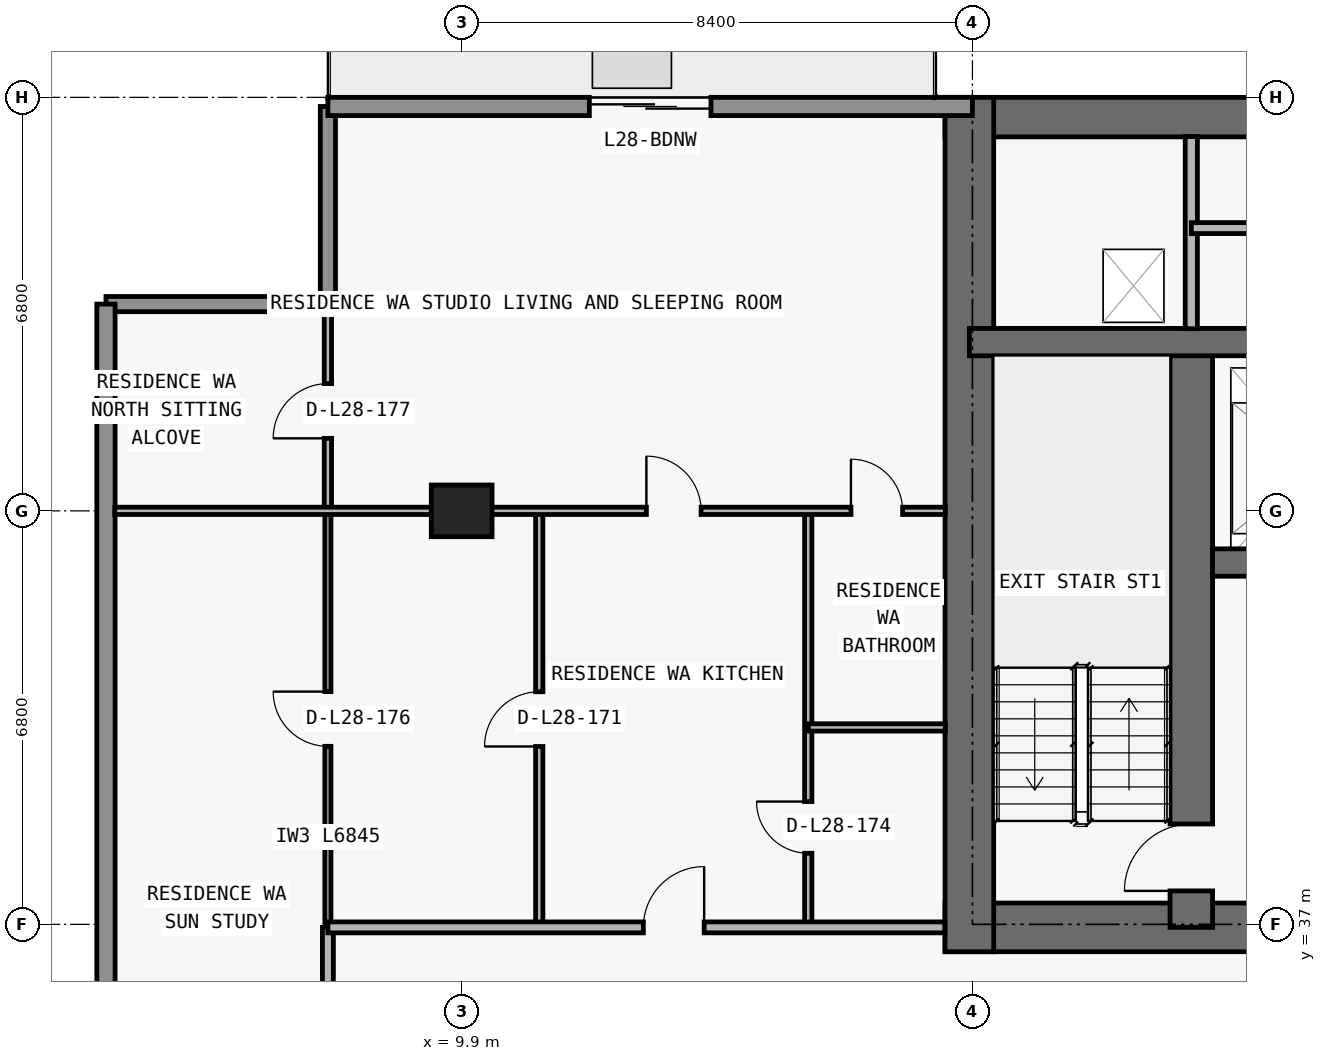
"""IFC4 building model, lengths in metres.
Left out: names, types, materials, properties, quantities, classifications, styles, units other than length and angle.
Written with IfcOpenShell. Run it as: python <this file> out.ifc"""

import sys

from ifc_helpers import new_model, si_unit, direction, frame, frame_2d, origin, origin_2d, place, context, subcontext, project, spatial, rectangle, extrude, element, fill, save


model = new_model("IFC4")
c1 = context("Model", 3, precision=1e-05, world=origin(), true_north=direction((0.0, 1.0)))
c2 = subcontext(c1, "Body", "Model", "MODEL_VIEW")
j1 = project(units=[si_unit("LENGTHUNIT", "METRE"), si_unit("PLANEANGLEUNIT", "RADIAN")], contexts=[c1])
p1 = place(None, origin())
s1 = spatial("IfcSite", under=j1, at=p1, CompositionType="ELEMENT")
p2 = place(p1, origin())
s2 = spatial("IfcBuilding", under=s1, at=p2, CompositionType="ELEMENT")
p3 = place(p2, frame((0.0, 0.0, 105.9)))
s3 = spatial("IfcBuildingStorey", under=s2, at=p3, CompositionType="ELEMENT", Elevation=105.9)
p4 = place(p3, frame((9.9, 43.8, 0.0), z_axis=(0.0, 0.0, 1.0), x_axis=(1.0, 0.0, 0.0)))
e1 = element("IfcColumn", 1, at=p4, inside=s3, PredefinedType="COLUMN", context=c2, shape_type="SweptSolid", body=[
    extrude(rectangle(XDim=1.0, YDim=0.85, at=origin_2d()), origin(), (0.0, 0.0, 1.0), 3.05),
])
p5 = place(p3, frame((17.85, 36.95, 0.0), z_axis=(0.0, 0.0, 1.0), x_axis=(1.0, 0.0, 0.0)))
e2 = element("IfcWall", 2, at=p5, inside=s3, PredefinedType="SHEAR", context=c2, shape_type="SweptSolid", body=[
    extrude(rectangle(XDim=42.1, YDim=0.8, at=frame_2d((21.05, 0.0))), origin(), (0.0, 0.0, 1.0), 3.05),
])
p6 = place(p5, frame((14.45, 0.0, 0.0)))
e3 = element("IfcOpeningElement", 3, at=p6, cuts=e2, PredefinedType="OPENING", context=c2, shape_type="SweptSolid", body=[
    extrude(rectangle(XDim=1.1, YDim=2.15, at=frame_2d((0.55, 1.075))), frame((0.0, 0.41, 0.0), z_axis=(0.0, -1.0, 0.0), x_axis=(1.0, 0.0, 0.0)), (0.0, 0.0, 1.0), 0.82),
])
p7 = place(p5, frame((6.3, 0.0, 0.0)))
e4 = element("IfcOpeningElement", 4, at=p7, cuts=e2, PredefinedType="OPENING", context=c2, shape_type="SweptSolid", body=[
    extrude(rectangle(XDim=1.05, YDim=2.15, at=frame_2d((0.525, 1.075))), frame((0.0, 0.41, 0.0), z_axis=(0.0, -1.0, 0.0), x_axis=(1.0, 0.0, 0.0)), (0.0, 0.0, 1.0), 0.82),
])
p8 = place(p5, frame((34.8, 0.0, 0.0)))
e5 = element("IfcOpeningElement", 5, at=p8, cuts=e2, PredefinedType="OPENING", context=c2, shape_type="SweptSolid", body=[
    extrude(rectangle(XDim=1.05, YDim=2.15, at=frame_2d((0.525, 1.075))), frame((0.0, 0.41, 0.0), z_axis=(0.0, -1.0, 0.0), x_axis=(1.0, 0.0, 0.0)), (0.0, 0.0, 1.0), 0.82),
])
p9 = place(p5, frame((10.913, 0.0, 0.0)))
e6 = element("IfcOpeningElement", 6, at=p9, cuts=e2, PredefinedType="OPENING", context=c2, shape_type="SweptSolid", body=[
    extrude(rectangle(XDim=1.05, YDim=2.15, at=frame_2d((0.525, 1.075))), frame((0.0, 0.41, 0.0), z_axis=(0.0, -1.0, 0.0), x_axis=(1.0, 0.0, 0.0)), (0.0, 0.0, 1.0), 0.82),
])
p10 = place(p5, frame((24.15, 0.0, 0.0)))
e7 = element("IfcOpeningElement", 7, at=p10, cuts=e2, PredefinedType="OPENING", context=c2, shape_type="SweptSolid", body=[
    extrude(rectangle(XDim=1.05, YDim=2.15, at=frame_2d((0.525, 1.075))), frame((0.0, 0.41, 0.0), z_axis=(0.0, -1.0, 0.0), x_axis=(1.0, 0.0, 0.0)), (0.0, 0.0, 1.0), 0.82),
])
p11 = place(p3, frame((17.85, 50.275, 0.0), z_axis=(0.0, 0.0, 1.0), x_axis=(1.0, 0.0, 0.0)))
e8 = element("IfcWall", 8, at=p11, inside=s3, PredefinedType="SHEAR", context=c2, shape_type="SweptSolid", body=[
    extrude(rectangle(XDim=42.1, YDim=0.65, at=frame_2d((21.05, 0.0))), origin(), (0.0, 0.0, 1.0), 3.05),
])
p12 = place(p3, frame((18.25, 36.55, 0.0), z_axis=(0.0, 0.0, 1.0), x_axis=(0.0, 1.0, 0.0)))
e9 = element("IfcWall", 9, at=p12, inside=s3, PredefinedType="SHEAR", context=c2, shape_type="SweptSolid", body=[
    extrude(rectangle(XDim=14.05, YDim=0.8, at=frame_2d((7.025, 0.0))), origin(), (0.0, 0.0, 1.0), 3.05),
])
p13 = place(p3, frame((21.9, 36.95, 0.0), z_axis=(0.0, 0.0, 1.0), x_axis=(0.0, 1.0, 0.0)))
e10 = element("IfcWall", 10, at=p13, inside=s3, PredefinedType="SHEAR", context=c2, shape_type="SweptSolid", body=[
    extrude(rectangle(XDim=9.625, YDim=0.7, at=frame_2d((4.812, 0.0))), origin(), (0.0, 0.0, 1.0), 3.05),
])
p14 = place(p13, frame((0.6, 0.0, 0.0)))
e11 = element("IfcOpeningElement", 11, at=p14, cuts=e10, PredefinedType="OPENING", context=c2, shape_type="SweptSolid", body=[
    extrude(rectangle(XDim=1.1, YDim=2.15, at=frame_2d((0.55, 1.075))), frame((0.0, 0.36, 0.0), z_axis=(0.0, -1.0, 0.0), x_axis=(1.0, 0.0, 0.0)), (0.0, 0.0, 1.0), 0.72),
])
p15 = place(p3, frame((22.25, 42.95, 0.0), z_axis=(0.0, 0.0, 1.0), x_axis=(1.0, 0.0, 0.0)))
e12 = element("IfcWall", 12, at=p15, inside=s3, PredefinedType="SHEAR", context=c2, shape_type="SweptSolid", body=[
    extrude(rectangle(XDim=33.3, YDim=0.45, at=frame_2d((16.65, 0.0))), origin(), (0.0, 0.0, 1.0), 3.05),
])
p16 = place(p15, frame((1.05, 0.0, 0.0)))
e13 = element("IfcOpeningElement", 13, at=p16, cuts=e12, PredefinedType="OPENING", context=c2, shape_type="SweptSolid", body=[
    extrude(rectangle(XDim=1.2, YDim=2.2, at=frame_2d((0.6, 1.1))), frame((0.0, 0.235, 0.0), z_axis=(0.0, -1.0, 0.0), x_axis=(1.0, 0.0, 0.0)), (0.0, 0.0, 1.0), 0.47),
])
p17 = place(p15, frame((31.05, 0.0, 0.0)))
e14 = element("IfcOpeningElement", 14, at=p17, cuts=e12, PredefinedType="OPENING", context=c2, shape_type="SweptSolid", body=[
    extrude(rectangle(XDim=1.2, YDim=2.2, at=frame_2d((0.6, 1.1))), frame((0.0, 0.235, 0.0), z_axis=(0.0, -1.0, 0.0), x_axis=(1.0, 0.0, 0.0)), (0.0, 0.0, 1.0), 0.47),
])
p18 = place(p15, frame((21.4, 0.0, 0.0)))
e15 = element("IfcOpeningElement", 15, at=p18, cuts=e12, PredefinedType="OPENING", context=c2, shape_type="SweptSolid", body=[
    extrude(rectangle(XDim=1.1, YDim=2.2, at=frame_2d((0.55, 1.1))), frame((0.0, 0.235, 0.0), z_axis=(0.0, -1.0, 0.0), x_axis=(1.0, 0.0, 0.0)), (0.0, 0.0, 1.0), 0.47),
])
p19 = place(p15, frame((24.0, 0.0, 0.0)))
e16 = element("IfcOpeningElement", 16, at=p19, cuts=e12, PredefinedType="OPENING", context=c2, shape_type="SweptSolid", body=[
    extrude(rectangle(XDim=1.1, YDim=2.2, at=frame_2d((0.55, 1.1))), frame((0.0, 0.235, 0.0), z_axis=(0.0, -1.0, 0.0), x_axis=(1.0, 0.0, 0.0)), (0.0, 0.0, 1.0), 0.47),
])
p20 = place(p15, frame((3.625, 0.0, 0.0)))
e17 = element("IfcOpeningElement", 17, at=p20, cuts=e12, PredefinedType="OPENING", context=c2, shape_type="SweptSolid", body=[
    extrude(rectangle(XDim=1.05, YDim=2.15, at=frame_2d((0.525, 1.075))), frame((0.0, 0.235, 0.0), z_axis=(0.0, -1.0, 0.0), x_axis=(1.0, 0.0, 0.0)), (0.0, 0.0, 1.0), 0.47),
])
p21 = place(p15, frame((28.675, 0.0, 0.0)))
e18 = element("IfcOpeningElement", 18, at=p21, cuts=e12, PredefinedType="OPENING", context=c2, shape_type="SweptSolid", body=[
    extrude(rectangle(XDim=1.05, YDim=2.15, at=frame_2d((0.525, 1.075))), frame((0.0, 0.235, 0.0), z_axis=(0.0, -1.0, 0.0), x_axis=(1.0, 0.0, 0.0)), (0.0, 0.0, 1.0), 0.47),
])
p22 = place(p15, frame((13.925, 0.0, 0.0)))
e19 = element("IfcOpeningElement", 19, at=p22, cuts=e12, PredefinedType="OPENING", context=c2, shape_type="SweptSolid", body=[
    extrude(rectangle(XDim=1.0, YDim=2.2, at=frame_2d((0.5, 1.1))), frame((0.0, 0.235, 0.0), z_axis=(0.0, -1.0, 0.0), x_axis=(1.0, 0.0, 0.0)), (0.0, 0.0, 1.0), 0.47),
])
p23 = place(p15, frame((18.05, 0.0, 0.0)))
e20 = element("IfcOpeningElement", 20, at=p23, cuts=e12, PredefinedType="OPENING", context=c2, shape_type="SweptSolid", body=[
    extrude(rectangle(XDim=1.0, YDim=2.2, at=frame_2d((0.5, 1.1))), frame((0.0, 0.235, 0.0), z_axis=(0.0, -1.0, 0.0), x_axis=(1.0, 0.0, 0.0)), (0.0, 0.0, 1.0), 0.47),
])
p24 = place(p3, frame((18.25, 46.575, 0.0), z_axis=(0.0, 0.0, 1.0), x_axis=(1.0, 0.0, 0.0)))
e21 = element("IfcWall", 21, at=p24, inside=s3, PredefinedType="SHEAR", context=c2, shape_type="SweptSolid", body=[
    extrude(rectangle(XDim=41.3, YDim=0.45, at=frame_2d((20.65, 0.0))), origin(), (0.0, 0.0, 1.0), 3.05),
])
p25 = place(p24, frame((7.625, 0.0, 0.0)))
e22 = element("IfcOpeningElement", 22, at=p25, cuts=e21, PredefinedType="OPENING", context=c2, shape_type="SweptSolid", body=[
    extrude(rectangle(XDim=1.05, YDim=2.15, at=frame_2d((0.525, 1.075))), frame((0.0, 0.235, 0.0), z_axis=(0.0, -1.0, 0.0), x_axis=(1.0, 0.0, 0.0)), (0.0, 0.0, 1.0), 0.47),
])
p26 = place(p24, frame((32.675, 0.0, 0.0)))
e23 = element("IfcOpeningElement", 23, at=p26, cuts=e21, PredefinedType="OPENING", context=c2, shape_type="SweptSolid", body=[
    extrude(rectangle(XDim=1.05, YDim=2.15, at=frame_2d((0.525, 1.075))), frame((0.0, 0.235, 0.0), z_axis=(0.0, -1.0, 0.0), x_axis=(1.0, 0.0, 0.0)), (0.0, 0.0, 1.0), 0.47),
])
p27 = place(p3, frame((4.05, 47.2, 0.0), z_axis=(0.0, 0.0, 1.0), x_axis=(1.0, 0.0, 0.0)))
e24 = element("IfcWall", 24, at=p27, inside=s3, PredefinedType="ELEMENTEDWALL", context=c2, shape_type="SweptSolid", body=[
    extrude(rectangle(XDim=3.65, YDim=0.25, at=frame_2d((1.825, 0.0))), origin(), (0.0, 0.0, 1.0), 3.05),
])
p28 = place(p3, frame((7.7, 47.2, 0.0), z_axis=(0.0, 0.0, 1.0), x_axis=(0.0, 1.0, 0.0)))
e25 = element("IfcWall", 25, at=p28, inside=s3, PredefinedType="ELEMENTEDWALL", context=c2, shape_type="SweptSolid", body=[
    extrude(rectangle(XDim=3.25, YDim=0.25, at=frame_2d((1.625, 0.0))), origin(), (0.0, 0.0, 1.0), 3.05),
])
p29 = place(p3, frame((4.05, 28.0, 0.0), z_axis=(0.0, 0.0, 1.0), x_axis=(0.0, 1.0, 0.0)))
e26 = element("IfcWall", 26, at=p29, inside=s3, PredefinedType="STANDARD", context=c2, shape_type="SweptSolid", body=[
    extrude(rectangle(XDim=19.2, YDim=0.3, at=frame_2d((9.6, 0.0))), origin(), (0.0, 0.0, 1.0), 3.05),
])
p30 = place(p3, frame((7.7, 50.45, 0.0), z_axis=(0.0, 0.0, 1.0), x_axis=(1.0, 0.0, 0.0)))
e27 = element("IfcWall", 27, at=p30, inside=s3, PredefinedType="STANDARD", context=c2, shape_type="SweptSolid", body=[
    extrude(rectangle(XDim=10.6, YDim=0.3, at=frame_2d((5.3, 0.0))), origin(), (0.0, 0.0, 1.0), 3.05),
])
p31 = place(p30, frame((4.3, 0.0, 0.0)))
e28 = element("IfcOpeningElement", 28, at=p31, cuts=e27, PredefinedType="OPENING", context=c2, shape_type="SweptSolid", body=[
    extrude(rectangle(XDim=2.0, YDim=2.3, at=frame_2d((1.0, 1.15))), frame((0.0, 0.16, 0.0), z_axis=(0.0, -1.0, 0.0), x_axis=(1.0, 0.0, 0.0)), (0.0, 0.0, 1.0), 0.32),
])
p32 = place(p3, frame((7.7, 34.605, 0.0), z_axis=(0.0, 0.0, 1.0), x_axis=(0.0, 1.0, 0.0)))
e29 = element("IfcWall", 29, at=p32, inside=s3, PredefinedType="PARTITIONING", context=c2, shape_type="SweptSolid", body=[
    extrude(rectangle(XDim=2.345, YDim=0.18, at=frame_2d((1.172, 0.0))), origin(), (0.0, 0.0, 1.0), 3.05),
])
p33 = place(p3, frame((7.7, 36.955, 0.0), z_axis=(0.0, 0.0, 1.0), x_axis=(0.0, 1.0, 0.0)))
e30 = element("IfcWall", 30, at=p33, inside=s3, PredefinedType="MOVABLE", context=c2, shape_type="SweptSolid", body=[
    extrude(rectangle(XDim=6.845, YDim=0.1, at=frame_2d((3.422, 0.0))), origin(), (0.0, 0.0, 1.0), 3.05),
])
p34 = place(p33, frame((2.972, 0.0, 0.0)))
e31 = element("IfcOpeningElement", 31, at=p34, cuts=e30, PredefinedType="OPENING", context=c2, shape_type="SweptSolid", body=[
    extrude(rectangle(XDim=0.9, YDim=2.15, at=frame_2d((0.45, 1.075))), frame((0.0, 0.06, 0.0), z_axis=(0.0, -1.0, 0.0), x_axis=(1.0, 0.0, 0.0)), (0.0, 0.0, 1.0), 0.12),
])
p35 = place(p3, frame((7.7, 43.805, 0.0), z_axis=(0.0, 0.0, 1.0), x_axis=(0.0, 1.0, 0.0)))
e32 = element("IfcWall", 32, at=p35, inside=s3, PredefinedType="PARTITIONING", context=c2, shape_type="SweptSolid", body=[
    extrude(rectangle(XDim=3.275, YDim=0.12, at=frame_2d((1.638, 0.0))), origin(), (0.0, 0.0, 1.0), 3.05),
])
p36 = place(p35, frame((1.188, 0.0, 0.0)))
e33 = element("IfcOpeningElement", 33, at=p36, cuts=e32, PredefinedType="OPENING", context=c2, shape_type="SweptSolid", body=[
    extrude(rectangle(XDim=0.9, YDim=2.15, at=frame_2d((0.45, 1.075))), frame((0.0, 0.07, 0.0), z_axis=(0.0, -1.0, 0.0), x_axis=(1.0, 0.0, 0.0)), (0.0, 0.0, 1.0), 0.14),
])
p37 = place(p3, frame((11.176, 36.95, 0.0), z_axis=(0.0, 0.0, 1.0), x_axis=(0.0, 1.0, 0.0)))
e34 = element("IfcWall", 34, at=p37, inside=s3, PredefinedType="PARTITIONING", context=c2, shape_type="SweptSolid", body=[
    extrude(rectangle(XDim=6.85, YDim=0.12, at=frame_2d((3.425, 0.0))), origin(), (0.0, 0.0, 1.0), 3.05),
])
p38 = place(p37, frame((2.975, 0.0, 0.0)))
e35 = element("IfcOpeningElement", 35, at=p38, cuts=e34, PredefinedType="OPENING", context=c2, shape_type="SweptSolid", body=[
    extrude(rectangle(XDim=0.9, YDim=2.15, at=frame_2d((0.45, 1.075))), frame((0.0, 0.07, 0.0), z_axis=(0.0, -1.0, 0.0), x_axis=(1.0, 0.0, 0.0)), (0.0, 0.0, 1.0), 0.14),
])
p39 = place(p3, frame((15.6, 36.95, 0.0), z_axis=(0.0, 0.0, 1.0), x_axis=(0.0, 1.0, 0.0)))
e36 = element("IfcWall", 36, at=p39, inside=s3, PredefinedType="PARTITIONING", context=c2, shape_type="SweptSolid", body=[
    extrude(rectangle(XDim=6.85, YDim=0.12, at=frame_2d((3.425, 0.0))), origin(), (0.0, 0.0, 1.0), 2.578),
])
p40 = place(p39, frame((1.219, 0.0, 0.0)))
e37 = element("IfcOpeningElement", 37, at=p40, cuts=e36, PredefinedType="OPENING", context=c2, shape_type="SweptSolid", body=[
    extrude(rectangle(XDim=0.85, YDim=2.1, at=frame_2d((0.425, 1.05))), frame((0.0, 0.07, 0.0), z_axis=(0.0, -1.0, 0.0), x_axis=(1.0, 0.0, 0.0)), (0.0, 0.0, 1.0), 0.14),
])
p41 = place(p3, frame((21.9, 46.795, 0.0), z_axis=(0.0, 0.0, 1.0), x_axis=(0.0, 1.0, 0.0)))
e38 = element("IfcWall", 38, at=p41, inside=s3, PredefinedType="PARTITIONING", context=c2, shape_type="SweptSolid", body=[
    extrude(rectangle(XDim=3.16, YDim=0.2, at=frame_2d((1.58, 0.0))), origin(), (0.0, 0.0, 1.0), 3.05),
])
p42 = place(p3, frame((7.7, 36.95, 0.0), z_axis=(0.0, 0.0, 1.0), x_axis=(1.0, 0.0, 0.0)))
e39 = element("IfcWall", 39, at=p42, inside=s3, PredefinedType="PARTITIONING", context=c2, shape_type="SweptSolid", body=[
    extrude(rectangle(XDim=10.145, YDim=0.18, at=frame_2d((5.073, 0.0))), origin(), (0.0, 0.0, 1.0), 3.05),
])
p43 = place(p42, frame((5.188, 0.0, 0.0)))
e40 = element("IfcOpeningElement", 40, at=p43, cuts=e39, PredefinedType="OPENING", context=c2, shape_type="SweptSolid", body=[
    extrude(rectangle(XDim=1.0, YDim=2.2, at=frame_2d((0.5, 1.1))), frame((0.0, 0.1, 0.0), z_axis=(0.0, -1.0, 0.0), x_axis=(1.0, 0.0, 0.0)), (0.0, 0.0, 1.0), 0.2),
])
p44 = place(p3, frame((15.6, 40.238, 0.0), z_axis=(0.0, 0.0, 1.0), x_axis=(1.0, 0.0, 0.0)))
e41 = element("IfcWall", 41, at=p44, inside=s3, PredefinedType="PARTITIONING", context=c2, shape_type="SweptSolid", body=[
    extrude(rectangle(XDim=2.255, YDim=0.12, at=frame_2d((1.127, 0.0))), origin(), (0.0, 0.0, 1.0), 3.05),
])
p45 = place(p3, frame((4.195, 43.8, 0.0), z_axis=(0.0, 0.0, 1.0), x_axis=(1.0, 0.0, 0.0)))
e42 = element("IfcWall", 42, at=p45, inside=s3, PredefinedType="PARTITIONING", context=c2, shape_type="SweptSolid", body=[
    extrude(rectangle(XDim=13.66, YDim=0.12, at=frame_2d((6.83, 0.0))), origin(), (0.0, 0.0, 1.0), 2.339),
])
p46 = place(p45, frame((8.743, 0.0, 0.0)))
e43 = element("IfcOpeningElement", 43, at=p46, cuts=e42, PredefinedType="OPENING", context=c2, shape_type="SweptSolid", body=[
    extrude(rectangle(XDim=0.9, YDim=2.15, at=frame_2d((0.45, 1.075))), frame((0.0, 0.07, 0.0), z_axis=(0.0, -1.0, 0.0), x_axis=(1.0, 0.0, 0.0)), (0.0, 0.0, 1.0), 0.14),
])
p47 = place(p45, frame((12.107, 0.0, 0.0)))
e44 = element("IfcOpeningElement", 44, at=p47, cuts=e42, PredefinedType="OPENING", context=c2, shape_type="SweptSolid", body=[
    extrude(rectangle(XDim=0.85, YDim=2.1, at=frame_2d((0.425, 1.05))), frame((0.0, 0.07, 0.0), z_axis=(0.0, -1.0, 0.0), x_axis=(1.0, 0.0, 0.0)), (0.0, 0.0, 1.0), 0.14),
])
p48 = place(p3, frame((21.9, 48.45, 0.0), z_axis=(0.0, 0.0, 1.0), x_axis=(1.0, 0.0, 0.0)))
e45 = element("IfcWall", 45, at=p48, inside=s3, PredefinedType="PARTITIONING", context=c2, shape_type="SweptSolid", body=[
    extrude(rectangle(XDim=4.75, YDim=0.18, at=frame_2d((2.375, 0.0))), origin(), (0.0, 0.0, 1.0), 3.05),
])
p49 = place(p48, frame((1.775, 0.0, 0.0)))
e46 = element("IfcOpeningElement", 46, at=p49, cuts=e45, PredefinedType="OPENING", context=c2, shape_type="SweptSolid", body=[
    extrude(rectangle(XDim=1.2, YDim=2.2, at=frame_2d((0.6, 1.1))), frame((0.0, 0.1, 0.0), z_axis=(0.0, -1.0, 0.0), x_axis=(1.0, 0.0, 0.0)), (0.0, 0.0, 1.0), 0.2),
])
p50 = place(p31, origin())
e47 = element("IfcDoor", 47, at=p50, inside=s3, OperationType="DOUBLE_DOOR_SLIDING", PredefinedType="DOOR", context=c2, shape_type="SweptSolid", body=[
    extrude(rectangle(XDim=2.0, YDim=2.3, at=frame_2d((1.0, 1.15))), frame((0.0, 0.025, 0.0), z_axis=(0.0, -1.0, 0.0), x_axis=(1.0, 0.0, 0.0)), (0.0, 0.0, 1.0), 0.05),
])
fill(e28, e47)
p51 = place(p14, origin())
e48 = element("IfcDoor", 48, at=p51, inside=s3, OperationType="SINGLE_SWING_LEFT", PredefinedType="DOOR", context=c2, shape_type="SweptSolid", body=[
    extrude(rectangle(XDim=1.1, YDim=2.15, at=frame_2d((0.55, 1.075))), frame((0.0, 0.025, 0.0), z_axis=(0.0, -1.0, 0.0), x_axis=(1.0, 0.0, 0.0)), (0.0, 0.0, 1.0), 0.05),
])
fill(e11, e48)
p52 = place(p38, origin())
e49 = element("IfcDoor", 49, at=p52, inside=s3, OperationType="SINGLE_SWING_LEFT", PredefinedType="DOOR", context=c2, shape_type="SweptSolid", body=[
    extrude(rectangle(XDim=0.9, YDim=2.15, at=frame_2d((0.45, 1.075))), frame((0.0, 0.025, 0.0), z_axis=(0.0, -1.0, 0.0), x_axis=(1.0, 0.0, 0.0)), (0.0, 0.0, 1.0), 0.05),
])
fill(e35, e49)
p53 = place(p43, origin())
e50 = element("IfcDoor", 50, at=p53, inside=s3, OperationType="SINGLE_SWING_RIGHT", PredefinedType="DOOR", context=c2, shape_type="SweptSolid", body=[
    extrude(rectangle(XDim=1.0, YDim=2.2, at=frame_2d((0.5, 1.1))), frame((0.0, 0.025, 0.0), z_axis=(0.0, -1.0, 0.0), x_axis=(1.0, 0.0, 0.0)), (0.0, 0.0, 1.0), 0.05),
])
fill(e40, e50)
p54 = place(p46, origin())
e51 = element("IfcDoor", 51, at=p54, inside=s3, OperationType="SINGLE_SWING_LEFT", PredefinedType="DOOR", context=c2, shape_type="SweptSolid", body=[
    extrude(rectangle(XDim=0.9, YDim=2.15, at=frame_2d((0.45, 1.075))), frame((0.0, 0.025, 0.0), z_axis=(0.0, -1.0, 0.0), x_axis=(1.0, 0.0, 0.0)), (0.0, 0.0, 1.0), 0.05),
])
fill(e43, e51)
p55 = place(p40, origin())
e52 = element("IfcDoor", 52, at=p55, inside=s3, OperationType="SINGLE_SWING_RIGHT", PredefinedType="DOOR", context=c2, shape_type="SweptSolid", body=[
    extrude(rectangle(XDim=0.85, YDim=2.1, at=frame_2d((0.425, 1.05))), frame((0.0, 0.025, 0.0), z_axis=(0.0, -1.0, 0.0), x_axis=(1.0, 0.0, 0.0)), (0.0, 0.0, 1.0), 0.05),
])
fill(e37, e52)
p56 = place(p47, origin())
e53 = element("IfcDoor", 53, at=p56, inside=s3, OperationType="SINGLE_SWING_LEFT", PredefinedType="DOOR", context=c2, shape_type="SweptSolid", body=[
    extrude(rectangle(XDim=0.85, YDim=2.1, at=frame_2d((0.425, 1.05))), frame((0.0, 0.025, 0.0), z_axis=(0.0, -1.0, 0.0), x_axis=(1.0, 0.0, 0.0)), (0.0, 0.0, 1.0), 0.05),
])
fill(e44, e53)
p57 = place(p34, origin())
e54 = element("IfcDoor", 54, at=p57, inside=s3, OperationType="SINGLE_SWING_RIGHT", PredefinedType="DOOR", context=c2, shape_type="SweptSolid", body=[
    extrude(rectangle(XDim=0.9, YDim=2.15, at=frame_2d((0.45, 1.075))), frame((0.0, 0.025, 0.0), z_axis=(0.0, -1.0, 0.0), x_axis=(1.0, 0.0, 0.0)), (0.0, 0.0, 1.0), 0.05),
])
fill(e31, e54)
p58 = place(p36, origin())
e55 = element("IfcDoor", 55, at=p58, inside=s3, OperationType="SINGLE_SWING_LEFT", PredefinedType="DOOR", context=c2, shape_type="SweptSolid", body=[
    extrude(rectangle(XDim=0.9, YDim=2.15, at=frame_2d((0.45, 1.075))), frame((0.0, 0.025, 0.0), z_axis=(0.0, -1.0, 0.0), x_axis=(1.0, 0.0, 0.0)), (0.0, 0.0, 1.0), 0.05),
])
fill(e33, e55)
save(model, sys.argv[1])
